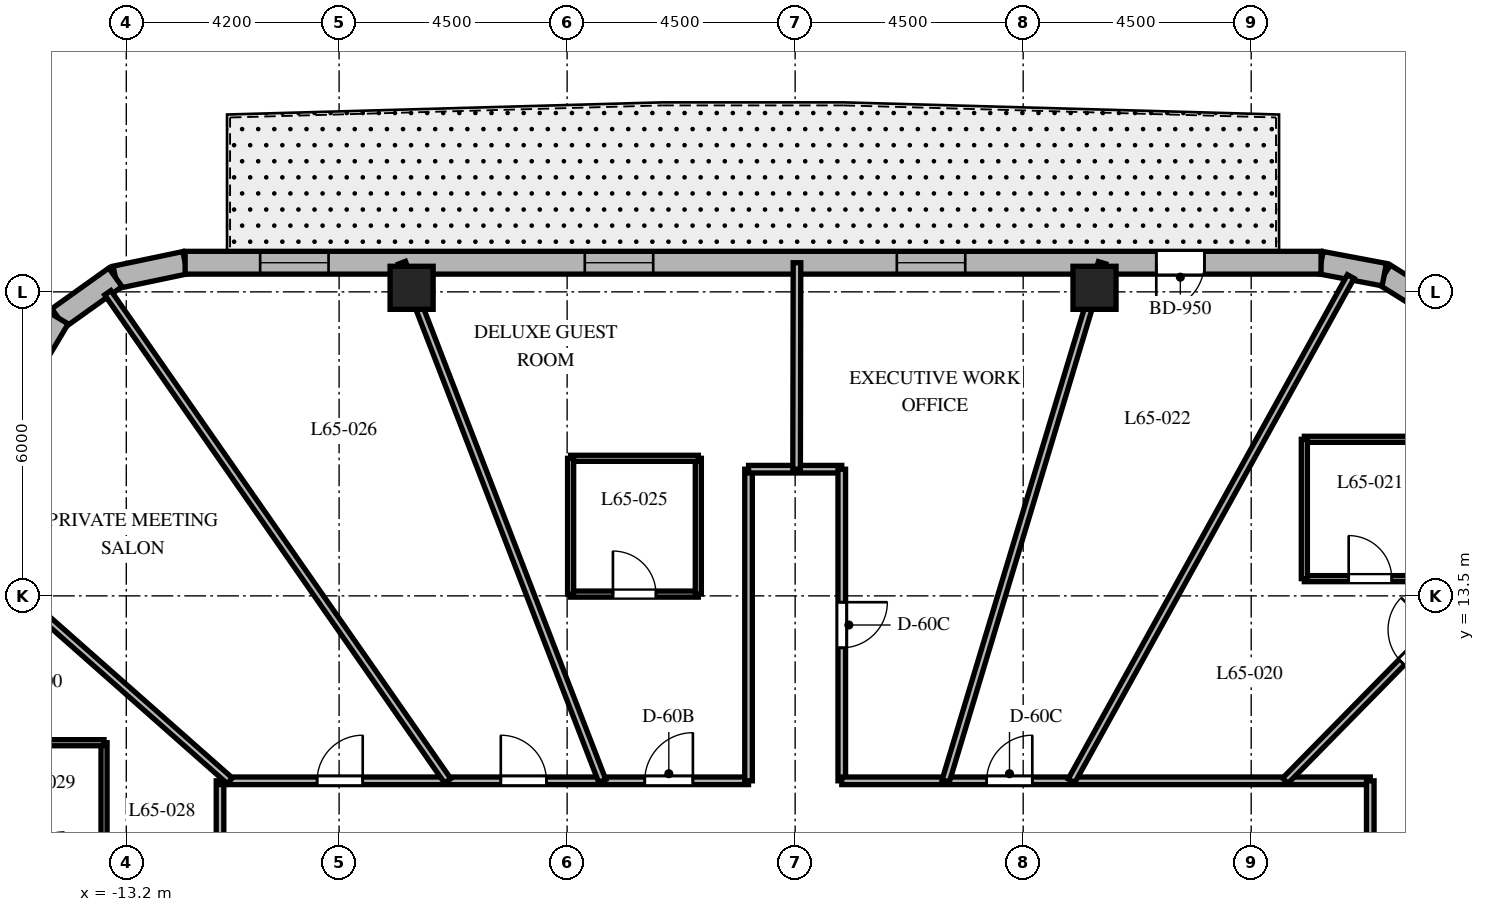
"""IFC4 building model, lengths in metres.
Left out: names, types, materials, properties, quantities, classifications, styles, units other than length and angle.
Written with IfcOpenShell. Run it as: python <this file> out.ifc"""

import sys

from ifc_helpers import new_model, si_unit, direction, frame, frame_2d, origin, origin_2d, place, context, subcontext, project, spatial, rectangle, extrude, element, fill, save


model = new_model("IFC4")
c1 = context("Model", 3, precision=1e-05, world=origin(), true_north=direction((0.0, 1.0)))
c2 = subcontext(c1, "Body", "Model", "MODEL_VIEW")
j1 = project(units=[si_unit("LENGTHUNIT", "METRE"), si_unit("PLANEANGLEUNIT", "RADIAN")], contexts=[c1])
p1 = place(None, origin())
s1 = spatial("IfcSite", under=j1, at=p1, CompositionType="ELEMENT")
p2 = place(p1, origin())
s2 = spatial("IfcBuilding", under=s1, at=p2, CompositionType="ELEMENT")
p3 = place(p2, frame((0.0, 0.0, 261.3)))
s3 = spatial("IfcBuildingStorey", under=s2, at=p3, CompositionType="ELEMENT", Elevation=261.3)
for number, where, z_axis, x_axis in (
    (1, (5.908, 19.58, 0.0), (0.0, 0.0, 1.0), (1.0, 0.0, 0.0)),
    (2, (-7.569, 19.58, 0.0), (0.0, 0.0, 1.0), (1.0, 0.0, 0.0)),
):
    element("IfcColumn", number, at=place(p3, frame(where, z_axis=z_axis, x_axis=x_axis)), inside=s3, PredefinedType="COLUMN", context=c2, shape_type="SweptSolid", body=[
        extrude(rectangle(XDim=0.85, YDim=0.85, at=origin_2d()), origin(), (0.0, 0.0, 1.0), 3.9),
    ])
p4 = place(p3, frame((12.685, 19.178, 0.0), z_axis=(0.0, 0.0, 1.0), x_axis=(-0.848031272749, 0.529946186362, 0.0)))
e3 = element("IfcWall", 3, at=p4, inside=s3, PredefinedType="SOLIDWALL", context=c2, shape_type="SweptSolid", body=[
    extrude(rectangle(XDim=1.248, YDim=0.45, at=frame_2d((0.624, 0.0))), origin(), (0.0, 0.0, 1.0), 3.6),
])
p5 = place(p3, frame((11.626, 19.84, 0.0), z_axis=(0.0, 0.0, 1.0), x_axis=(-0.982701956681, 0.185194126083, 0.0)))
e4 = element("IfcWall", 4, at=p5, inside=s3, PredefinedType="SOLIDWALL", context=c2, shape_type="SweptSolid", body=[
    extrude(rectangle(XDim=1.27, YDim=0.45, at=frame_2d((0.635, 0.0))), origin(), (0.0, 0.0, 1.0), 3.6),
])
p6 = place(p3, frame((-12.038, 20.075, 0.0), z_axis=(0.0, 0.0, 1.0), x_axis=(-0.978750122553, -0.205056571711, 0.0)))
e5 = element("IfcWall", 5, at=p6, inside=s3, PredefinedType="SOLIDWALL", context=c2, shape_type="SweptSolid", body=[
    extrude(rectangle(XDim=1.406, YDim=0.45, at=frame_2d((0.703, 0.0))), origin(), (0.0, 0.0, 1.0), 3.6),
])
p7 = place(p3, frame((-13.415, 19.787, 0.0), z_axis=(0.0, 0.0, 1.0), x_axis=(-0.814055493997, -0.580787097561, 0.0)))
e6 = element("IfcWall", 6, at=p7, inside=s3, PredefinedType="SOLIDWALL", context=c2, shape_type="SweptSolid", body=[
    extrude(rectangle(XDim=1.383, YDim=0.45, at=frame_2d((0.691, 0.0))), origin(), (0.0, 0.0, 1.0), 3.6),
])
p8 = place(p3, frame((-14.54, 18.984, 0.0), z_axis=(0.0, 0.0, 1.0), x_axis=(-0.512374906623, -0.858761873317, 0.0)))
e7 = element("IfcWall", 7, at=p8, inside=s3, PredefinedType="SOLIDWALL", context=c2, shape_type="SweptSolid", body=[
    extrude(rectangle(XDim=1.406, YDim=0.45, at=frame_2d((0.703, 0.0))), origin(), (0.0, 0.0, 1.0), 3.6),
])
p9 = place(p3, frame((10.379, 20.075, 0.0), z_axis=(0.0, 0.0, 1.0), x_axis=(-1.0, 0.0, 0.0)))
e8 = element("IfcWall", 8, at=p9, inside=s3, PredefinedType="SOLIDWALL", context=c2, shape_type="SweptSolid", body=[
    extrude(rectangle(XDim=22.417, YDim=0.45, at=frame_2d((11.208, 0.0))), origin(), (0.0, 0.0, 1.0), 3.6),
])
p10 = place(p9, frame((2.302, 0.0, 0.0)))
e9 = element("IfcOpeningElement", 9, at=p10, cuts=e8, PredefinedType="OPENING", context=c2, shape_type="SweptSolid", body=[
    extrude(rectangle(XDim=0.95, YDim=2.15, at=frame_2d((0.475, 1.075))), frame((0.0, 0.235, 0.0), z_axis=(0.0, -1.0, 0.0), x_axis=(1.0, 0.0, 0.0)), (0.0, 0.0, 1.0), 0.47),
])
p11 = place(p9, frame((7.022, 0.0, 0.8)))
e10 = element("IfcOpeningElement", 10, at=p11, cuts=e8, PredefinedType="OPENING", context=c2, shape_type="SweptSolid", body=[
    extrude(rectangle(XDim=1.35, YDim=1.75, at=frame_2d((0.675, 0.875))), frame((0.0, 0.235, 0.0), z_axis=(0.0, -1.0, 0.0), x_axis=(1.0, 0.0, 0.0)), (0.0, 0.0, 1.0), 0.47),
])
p12 = place(p9, frame((13.18, 0.0, 0.8)))
e11 = element("IfcOpeningElement", 11, at=p12, cuts=e8, PredefinedType="OPENING", context=c2, shape_type="SweptSolid", body=[
    extrude(rectangle(XDim=1.35, YDim=1.75, at=frame_2d((0.675, 0.875))), frame((0.0, 0.235, 0.0), z_axis=(0.0, -1.0, 0.0), x_axis=(1.0, 0.0, 0.0)), (0.0, 0.0, 1.0), 0.47),
])
p13 = place(p9, frame((19.587, 0.0, 0.8)))
e12 = element("IfcOpeningElement", 12, at=p13, cuts=e8, PredefinedType="OPENING", context=c2, shape_type="SweptSolid", body=[
    extrude(rectangle(XDim=1.35, YDim=1.75, at=frame_2d((0.675, 0.875))), frame((0.0, 0.235, 0.0), z_axis=(0.0, -1.0, 0.0), x_axis=(1.0, 0.0, 0.0)), (0.0, 0.0, 1.0), 0.47),
])
p14 = place(p3, frame((-11.35, 4.4, 0.0), z_axis=(0.0, 0.0, 1.0), x_axis=(0.0, 1.0, 0.0)))
e13 = element("IfcWall", 13, at=p14, inside=s3, PredefinedType="PARTITIONING", context=c2, shape_type="SweptSolid", body=[
    extrude(rectangle(XDim=5.45, YDim=0.15, at=frame_2d((2.725, 0.0))), origin(), (0.0, 0.0, 1.0), 3.09),
])
p15 = place(p14, frame((2.458, 0.0, 0.0)))
e14 = element("IfcOpeningElement", 14, at=p15, cuts=e13, PredefinedType="OPENING", context=c2, shape_type="SweptSolid", body=[
    extrude(rectangle(XDim=0.95, YDim=2.03, at=frame_2d((0.475, 1.015))), frame((0.0, 0.085, 0.0), z_axis=(0.0, -1.0, 0.0), x_axis=(1.0, 0.0, 0.0)), (0.0, 0.0, 1.0), 0.17),
])
p16 = place(p3, frame((-11.35, 9.85, 0.0), z_axis=(0.0, 0.0, 1.0), x_axis=(1.0, 0.0, 0.0)))
e15 = element("IfcWall", 15, at=p16, inside=s3, PredefinedType="PARTITIONING", context=c2, shape_type="SweptSolid", body=[
    extrude(rectangle(XDim=10.43, YDim=0.15, at=frame_2d((5.215, 0.0))), origin(), (0.0, 0.0, 1.0), 3.09),
])
p17 = place(p16, frame((8.382, 0.0, 0.0)))
e16 = element("IfcOpeningElement", 16, at=p17, cuts=e15, PredefinedType="OPENING", context=c2, shape_type="SweptSolid", body=[
    extrude(rectangle(XDim=0.95, YDim=2.03, at=frame_2d((0.475, 1.015))), frame((0.0, 0.085, 0.0), z_axis=(0.0, -1.0, 0.0), x_axis=(1.0, 0.0, 0.0)), (0.0, 0.0, 1.0), 0.17),
])
p18 = place(p16, frame((5.541, 0.0, 0.0)))
e17 = element("IfcOpeningElement", 17, at=p18, cuts=e15, PredefinedType="OPENING", context=c2, shape_type="SweptSolid", body=[
    extrude(rectangle(XDim=0.9, YDim=2.03, at=frame_2d((0.45, 1.015))), frame((0.0, 0.085, 0.0), z_axis=(0.0, -1.0, 0.0), x_axis=(1.0, 0.0, 0.0)), (0.0, 0.0, 1.0), 0.17),
])
p19 = place(p16, frame((1.916, 0.0, 0.0)))
e18 = element("IfcOpeningElement", 18, at=p19, cuts=e15, PredefinedType="OPENING", context=c2, shape_type="SweptSolid", body=[
    extrude(rectangle(XDim=0.9, YDim=2.03, at=frame_2d((0.45, 1.015))), frame((0.0, 0.085, 0.0), z_axis=(0.0, -1.0, 0.0), x_axis=(1.0, 0.0, 0.0)), (0.0, 0.0, 1.0), 0.17),
])
p20 = place(p3, frame((-0.92, 9.85, 0.0), z_axis=(0.0, 0.0, 1.0), x_axis=(0.0, 1.0, 0.0)))
e19 = element("IfcWall", 19, at=p20, inside=s3, PredefinedType="PARTITIONING", context=c2, shape_type="SweptSolid", body=[
    extrude(rectangle(XDim=6.15, YDim=0.15, at=frame_2d((3.075, 0.0))), origin(), (0.0, 0.0, 1.0), 3.041),
])
p21 = place(p3, frame((-0.92, 16.0, 0.0), z_axis=(0.0, 0.0, 1.0), x_axis=(1.0, 0.0, 0.0)))
e20 = element("IfcWall", 20, at=p21, inside=s3, PredefinedType="PARTITIONING", context=c2, shape_type="SweptSolid", body=[
    extrude(rectangle(XDim=1.84, YDim=0.15, at=frame_2d((0.92, 0.0))), origin(), (0.0, 0.0, 1.0), 3.6),
])
p22 = place(p3, frame((0.92, 16.0, 0.0), z_axis=(0.0, 0.0, 1.0), x_axis=(0.0, -1.0, 0.0)))
e21 = element("IfcWall", 21, at=p22, inside=s3, PredefinedType="PARTITIONING", context=c2, shape_type="SweptSolid", body=[
    extrude(rectangle(XDim=6.15, YDim=0.15, at=frame_2d((3.075, 0.0))), origin(), (0.0, 0.0, 1.0), 3.041),
])
p23 = place(p22, frame((2.625, 0.0, 0.0)))
e22 = element("IfcOpeningElement", 22, at=p23, cuts=e21, PredefinedType="OPENING", context=c2, shape_type="SweptSolid", body=[
    extrude(rectangle(XDim=0.9, YDim=2.03, at=frame_2d((0.45, 1.015))), frame((0.0, 0.085, 0.0), z_axis=(0.0, -1.0, 0.0), x_axis=(1.0, 0.0, 0.0)), (0.0, 0.0, 1.0), 0.17),
])
p24 = place(p3, frame((0.92, 9.85, 0.0), z_axis=(0.0, 0.0, 1.0), x_axis=(1.0, 0.0, 0.0)))
e23 = element("IfcWall", 23, at=p24, inside=s3, PredefinedType="PARTITIONING", context=c2, shape_type="SweptSolid", body=[
    extrude(rectangle(XDim=10.43, YDim=0.15, at=frame_2d((5.215, 0.0))), origin(), (0.0, 0.0, 1.0), 3.09),
])
p25 = place(p24, frame((2.86, 0.0, 0.0)))
e24 = element("IfcOpeningElement", 24, at=p25, cuts=e23, PredefinedType="OPENING", context=c2, shape_type="SweptSolid", body=[
    extrude(rectangle(XDim=0.9, YDim=2.03, at=frame_2d((0.45, 1.015))), frame((0.0, 0.085, 0.0), z_axis=(0.0, -1.0, 0.0), x_axis=(1.0, 0.0, 0.0)), (0.0, 0.0, 1.0), 0.17),
])
p26 = place(p3, frame((11.35, 9.85, 0.0), z_axis=(0.0, 0.0, 1.0), x_axis=(0.0, -1.0, 0.0)))
e25 = element("IfcWall", 25, at=p26, inside=s3, PredefinedType="PARTITIONING", context=c2, shape_type="SweptSolid", body=[
    extrude(rectangle(XDim=12.4, YDim=0.15, at=frame_2d((6.2, 0.0))), origin(), (0.0, 0.0, 1.0), 3.09),
])
p27 = place(p26, frame((7.697, 0.0, 0.0)))
e26 = element("IfcOpeningElement", 26, at=p27, cuts=e25, PredefinedType="OPENING", context=c2, shape_type="SweptSolid", body=[
    extrude(rectangle(XDim=0.95, YDim=2.03, at=frame_2d((0.475, 1.015))), frame((0.0, 0.085, 0.0), z_axis=(0.0, -1.0, 0.0), x_axis=(1.0, 0.0, 0.0)), (0.0, 0.0, 1.0), 0.17),
])
p28 = place(p26, frame((2.973, 0.0, 0.0)))
e27 = element("IfcOpeningElement", 27, at=p28, cuts=e25, PredefinedType="OPENING", context=c2, shape_type="SweptSolid", body=[
    extrude(rectangle(XDim=1.0, YDim=2.03, at=frame_2d((0.5, 1.015))), frame((0.0, 0.085, 0.0), z_axis=(0.0, -1.0, 0.0), x_axis=(1.0, 0.0, 0.0)), (0.0, 0.0, 1.0), 0.17),
])
p29 = place(p26, frame((10.333, 0.0, 0.0)))
e28 = element("IfcOpeningElement", 28, at=p29, cuts=e25, PredefinedType="OPENING", context=c2, shape_type="SweptSolid", body=[
    extrude(rectangle(XDim=0.9, YDim=2.03, at=frame_2d((0.45, 1.015))), frame((0.0, 0.085, 0.0), z_axis=(0.0, -1.0, 0.0), x_axis=(1.0, 0.0, 0.0)), (0.0, 0.0, 1.0), 0.17),
])
p30 = place(p3, frame((9.672, 9.85, 0.0), z_axis=(0.0, 0.0, 1.0), x_axis=(0.700629771301, 0.713524998558, 0.0)))
e29 = element("IfcWall", 29, at=p30, inside=s3, PredefinedType="PARTITIONING", context=c2, shape_type="SweptSolid", body=[
    extrude(rectangle(XDim=7.459, YDim=0.15, at=frame_2d((3.73, 0.0))), origin(), (0.0, 0.0, 1.0), 2.94),
])
p31 = place(p30, frame((3.28, 0.0, 0.0)))
e30 = element("IfcOpeningElement", 30, at=p31, cuts=e29, PredefinedType="OPENING", context=c2, shape_type="SweptSolid", body=[
    extrude(rectangle(XDim=0.9, YDim=2.03, at=frame_2d((0.45, 1.015))), frame((0.0, 0.085, 0.0), z_axis=(0.0, -1.0, 0.0), x_axis=(1.0, 0.0, 0.0)), (0.0, 0.0, 1.0), 0.17),
])
p32 = place(p3, frame((5.454, 9.85, 0.0), z_axis=(0.0, 0.0, 1.0), x_axis=(0.48439420613, 0.874849846012, 0.0)))
e31 = element("IfcWall", 31, at=p32, inside=s3, PredefinedType="PARTITIONING", context=c2, shape_type="SweptSolid", body=[
    extrude(rectangle(XDim=11.375, YDim=0.15, at=frame_2d((5.688, 0.0))), origin(), (0.0, 0.0, 1.0), 2.94),
])
p33 = place(p3, frame((2.972, 9.85, 0.0), z_axis=(0.0, 0.0, 1.0), x_axis=(0.288872169679, 0.957367677324, 0.0)))
e32 = element("IfcWall", 32, at=p33, inside=s3, PredefinedType="PARTITIONING", context=c2, shape_type="SweptSolid", body=[
    extrude(rectangle(XDim=10.68, YDim=0.15, at=frame_2d((5.34, 0.0))), origin(), (0.0, 0.0, 1.0), 2.94),
])
p34 = place(p3, frame((0.029, 16.0, 0.0), z_axis=(0.0, 0.0, 1.0), x_axis=(0.001797372928, 0.999998384724, 0.0)))
e33 = element("IfcWall", 33, at=p34, inside=s3, PredefinedType="PARTITIONING", context=c2, shape_type="SweptSolid", body=[
    extrude(rectangle(XDim=4.075, YDim=0.15, at=frame_2d((2.038, 0.0))), origin(), (0.0, 0.0, 1.0), 2.94),
])
p35 = place(p3, frame((-3.808, 9.85, 0.0), z_axis=(0.0, 0.0, 1.0), x_axis=(-0.360587327934, 0.932725457427, 0.0)))
e34 = element("IfcWall", 34, at=p35, inside=s3, PredefinedType="PARTITIONING", context=c2, shape_type="SweptSolid", body=[
    extrude(rectangle(XDim=10.962, YDim=0.15, at=frame_2d((5.481, 0.0))), origin(), (0.0, 0.0, 1.0), 2.94),
])
p36 = place(p3, frame((-6.858, 9.85, 0.0), z_axis=(0.0, 0.0, 1.0), x_axis=(-0.571391702066, 0.820677477948, 0.0)))
e35 = element("IfcWall", 35, at=p36, inside=s3, PredefinedType="PARTITIONING", context=c2, shape_type="SweptSolid", body=[
    extrude(rectangle(XDim=11.738, YDim=0.15, at=frame_2d((5.869, 0.0))), origin(), (0.0, 0.0, 1.0), 2.94),
])
p37 = place(p3, frame((-11.157, 9.85, 0.0), z_axis=(0.0, 0.0, 1.0), x_axis=(-0.74966962095, 0.661812253909, 0.0)))
e36 = element("IfcWall", 36, at=p37, inside=s3, PredefinedType="PARTITIONING", context=c2, shape_type="SweptSolid", body=[
    extrude(rectangle(XDim=6.989, YDim=0.15, at=frame_2d((3.494, 0.0))), origin(), (0.0, 0.0, 1.0), 2.94),
])
p38 = place(p3, frame((10.049, 13.84, 0.0), z_axis=(0.0, 0.0, 1.0), x_axis=(1.0, 0.0, 0.0)))
e37 = element("IfcWall", 37, at=p38, inside=s3, PredefinedType="PARTITIONING", context=c2, shape_type="SweptSolid", body=[
    extrude(rectangle(XDim=2.6, YDim=0.12, at=frame_2d((1.3, 0.0))), origin(), (0.0, 0.0, 1.0), 3.6),
])
p39 = place(p38, frame((0.875, 0.0, 0.0)))
e38 = element("IfcOpeningElement", 38, at=p39, cuts=e37, PredefinedType="OPENING", context=c2, shape_type="SweptSolid", body=[
    extrude(rectangle(XDim=0.85, YDim=2.03, at=frame_2d((0.425, 1.015))), frame((0.0, 0.07, 0.0), z_axis=(0.0, -1.0, 0.0), x_axis=(1.0, 0.0, 0.0)), (0.0, 0.0, 1.0), 0.14),
])
p40 = place(p3, frame((12.649, 16.59, 0.0), z_axis=(0.0, 0.0, 1.0), x_axis=(-1.0, 0.0, 0.0)))
e39 = element("IfcWall", 39, at=p40, inside=s3, PredefinedType="PARTITIONING", context=c2, shape_type="SweptSolid", body=[
    extrude(rectangle(XDim=2.6, YDim=0.12, at=frame_2d((1.3, 0.0))), origin(), (0.0, 0.0, 1.0), 2.94),
])
p41 = place(p3, frame((10.049, 16.59, 0.0), z_axis=(0.0, 0.0, 1.0), x_axis=(0.0, -1.0, 0.0)))
e40 = element("IfcWall", 40, at=p41, inside=s3, PredefinedType="PARTITIONING", context=c2, shape_type="SweptSolid", body=[
    extrude(rectangle(XDim=2.75, YDim=0.12, at=frame_2d((1.375, 0.0))), origin(), (0.0, 0.0, 1.0), 3.6),
])
p42 = place(p3, frame((-4.431, 13.535, 0.0), z_axis=(0.0, 0.0, 1.0), x_axis=(1.0, 0.0, 0.0)))
e41 = element("IfcWall", 41, at=p42, inside=s3, PredefinedType="PARTITIONING", context=c2, shape_type="SweptSolid", body=[
    extrude(rectangle(XDim=2.52, YDim=0.12, at=frame_2d((1.26, 0.0))), origin(), (0.0, 0.0, 1.0), 3.6),
])
p43 = place(p42, frame((0.835, 0.0, 0.0)))
e42 = element("IfcOpeningElement", 42, at=p43, cuts=e41, PredefinedType="OPENING", context=c2, shape_type="SweptSolid", body=[
    extrude(rectangle(XDim=0.85, YDim=2.03, at=frame_2d((0.425, 1.015))), frame((0.0, 0.07, 0.0), z_axis=(0.0, -1.0, 0.0), x_axis=(1.0, 0.0, 0.0)), (0.0, 0.0, 1.0), 0.14),
])
p44 = place(p3, frame((-1.911, 13.535, 0.0), z_axis=(0.0, 0.0, 1.0), x_axis=(0.0, 1.0, 0.0)))
e43 = element("IfcWall", 43, at=p44, inside=s3, PredefinedType="PARTITIONING", context=c2, shape_type="SweptSolid", body=[
    extrude(rectangle(XDim=2.68, YDim=0.12, at=frame_2d((1.34, 0.0))), origin(), (0.0, 0.0, 1.0), 3.041),
])
p45 = place(p3, frame((-1.911, 16.215, 0.0), z_axis=(0.0, 0.0, 1.0), x_axis=(-1.0, 0.0, 0.0)))
e44 = element("IfcWall", 44, at=p45, inside=s3, PredefinedType="PARTITIONING", context=c2, shape_type="SweptSolid", body=[
    extrude(rectangle(XDim=2.52, YDim=0.12, at=frame_2d((1.26, 0.0))), origin(), (0.0, 0.0, 1.0), 3.6),
])
p46 = place(p3, frame((-4.431, 16.215, 0.0), z_axis=(0.0, 0.0, 1.0), x_axis=(0.0, -1.0, 0.0)))
e45 = element("IfcWall", 45, at=p46, inside=s3, PredefinedType="PARTITIONING", context=c2, shape_type="SweptSolid", body=[
    extrude(rectangle(XDim=2.68, YDim=0.12, at=frame_2d((1.34, 0.0))), origin(), (0.0, 0.0, 1.0), 3.041),
])
p47 = place(p3, frame((-13.639, 7.992, 0.0), z_axis=(0.0, 0.0, 1.0), x_axis=(0.0, 1.0, 0.0)))
e46 = element("IfcWall", 46, at=p47, inside=s3, PredefinedType="PARTITIONING", context=c2, shape_type="SweptSolid", body=[
    extrude(rectangle(XDim=2.61, YDim=0.12, at=frame_2d((1.305, 0.0))), origin(), (0.0, 0.0, 1.0), 3.6),
])
p48 = place(p3, frame((-13.639, 10.602, 0.0), z_axis=(0.0, 0.0, 1.0), x_axis=(-1.0, 0.0, 0.0)))
e47 = element("IfcWall", 47, at=p48, inside=s3, PredefinedType="PARTITIONING", context=c2, shape_type="SweptSolid", body=[
    extrude(rectangle(XDim=2.44, YDim=0.12, at=frame_2d((1.22, 0.0))), origin(), (0.0, 0.0, 1.0), 3.172),
])
p49 = place(p10, origin())
e48 = element("IfcDoor", 48, at=p49, inside=s3, OperationType="SINGLE_SWING_RIGHT", PredefinedType="DOOR", context=c2, shape_type="SweptSolid", body=[
    extrude(rectangle(XDim=0.95, YDim=2.15, at=frame_2d((0.475, 1.075))), frame((0.0, 0.025, 0.0), z_axis=(0.0, -1.0, 0.0), x_axis=(1.0, 0.0, 0.0)), (0.0, 0.0, 1.0), 0.05),
])
fill(e9, e48)
p50 = place(p11, origin())
e49 = element("IfcWindow", 49, at=p50, inside=s3, PartitioningType="SINGLE_PANEL", PredefinedType="WINDOW", context=c2, shape_type="SweptSolid", body=[
    extrude(rectangle(XDim=1.35, YDim=1.75, at=frame_2d((0.675, 0.875))), frame((0.0, 0.03, 0.0), z_axis=(0.0, -1.0, 0.0), x_axis=(1.0, 0.0, 0.0)), (0.0, 0.0, 1.0), 0.06),
])
fill(e10, e49)
p51 = place(p12, origin())
e50 = element("IfcWindow", 50, at=p51, inside=s3, PartitioningType="SINGLE_PANEL", PredefinedType="WINDOW", context=c2, shape_type="SweptSolid", body=[
    extrude(rectangle(XDim=1.35, YDim=1.75, at=frame_2d((0.675, 0.875))), frame((0.0, 0.03, 0.0), z_axis=(0.0, -1.0, 0.0), x_axis=(1.0, 0.0, 0.0)), (0.0, 0.0, 1.0), 0.06),
])
fill(e11, e50)
p52 = place(p13, origin())
e51 = element("IfcWindow", 51, at=p52, inside=s3, PartitioningType="SINGLE_PANEL", PredefinedType="WINDOW", context=c2, shape_type="SweptSolid", body=[
    extrude(rectangle(XDim=1.35, YDim=1.75, at=frame_2d((0.675, 0.875))), frame((0.0, 0.03, 0.0), z_axis=(0.0, -1.0, 0.0), x_axis=(1.0, 0.0, 0.0)), (0.0, 0.0, 1.0), 0.06),
])
fill(e12, e51)
p53 = place(p31, origin())
e52 = element("IfcDoor", 52, at=p53, inside=s3, OperationType="SINGLE_SWING_RIGHT", PredefinedType="DOOR", context=c2, shape_type="SweptSolid", body=[
    extrude(rectangle(XDim=0.9, YDim=2.03, at=frame_2d((0.45, 1.015))), frame((0.0, 0.025, 0.0), z_axis=(0.0, -1.0, 0.0), x_axis=(1.0, 0.0, 0.0)), (0.0, 0.0, 1.0), 0.05),
])
fill(e30, e52)
p54 = place(p39, origin())
e53 = element("IfcDoor", 53, at=p54, inside=s3, OperationType="SINGLE_SWING_LEFT", PredefinedType="DOOR", context=c2, shape_type="SweptSolid", body=[
    extrude(rectangle(XDim=0.85, YDim=2.03, at=frame_2d((0.425, 1.015))), frame((0.0, 0.025, 0.0), z_axis=(0.0, -1.0, 0.0), x_axis=(1.0, 0.0, 0.0)), (0.0, 0.0, 1.0), 0.05),
])
fill(e38, e53)
p55 = place(p25, origin())
e54 = element("IfcDoor", 54, at=p55, inside=s3, OperationType="SINGLE_SWING_RIGHT", PredefinedType="DOOR", context=c2, shape_type="SweptSolid", body=[
    extrude(rectangle(XDim=0.9, YDim=2.03, at=frame_2d((0.45, 1.015))), frame((0.0, 0.025, 0.0), z_axis=(0.0, -1.0, 0.0), x_axis=(1.0, 0.0, 0.0)), (0.0, 0.0, 1.0), 0.05),
])
fill(e24, e54)
p56 = place(p23, origin())
e55 = element("IfcDoor", 55, at=p56, inside=s3, OperationType="SINGLE_SWING_LEFT", PredefinedType="DOOR", context=c2, shape_type="SweptSolid", body=[
    extrude(rectangle(XDim=0.9, YDim=2.03, at=frame_2d((0.45, 1.015))), frame((0.0, 0.025, 0.0), z_axis=(0.0, -1.0, 0.0), x_axis=(1.0, 0.0, 0.0)), (0.0, 0.0, 1.0), 0.05),
])
fill(e22, e55)
p57 = place(p17, origin())
e56 = element("IfcDoor", 56, at=p57, inside=s3, OperationType="SINGLE_SWING_RIGHT", PredefinedType="DOOR", context=c2, shape_type="SweptSolid", body=[
    extrude(rectangle(XDim=0.95, YDim=2.03, at=frame_2d((0.475, 1.015))), frame((0.0, 0.025, 0.0), z_axis=(0.0, -1.0, 0.0), x_axis=(1.0, 0.0, 0.0)), (0.0, 0.0, 1.0), 0.05),
])
fill(e16, e56)
p58 = place(p43, origin())
e57 = element("IfcDoor", 57, at=p58, inside=s3, OperationType="SINGLE_SWING_LEFT", PredefinedType="DOOR", context=c2, shape_type="SweptSolid", body=[
    extrude(rectangle(XDim=0.85, YDim=2.03, at=frame_2d((0.425, 1.015))), frame((0.0, 0.025, 0.0), z_axis=(0.0, -1.0, 0.0), x_axis=(1.0, 0.0, 0.0)), (0.0, 0.0, 1.0), 0.05),
])
fill(e42, e57)
p59 = place(p18, origin())
e58 = element("IfcDoor", 58, at=p59, inside=s3, OperationType="SINGLE_SWING_LEFT", PredefinedType="DOOR", context=c2, shape_type="SweptSolid", body=[
    extrude(rectangle(XDim=0.9, YDim=2.03, at=frame_2d((0.45, 1.015))), frame((0.0, 0.025, 0.0), z_axis=(0.0, -1.0, 0.0), x_axis=(1.0, 0.0, 0.0)), (0.0, 0.0, 1.0), 0.05),
])
fill(e17, e58)
p60 = place(p19, origin())
e59 = element("IfcDoor", 59, at=p60, inside=s3, OperationType="SINGLE_SWING_RIGHT", PredefinedType="DOOR", context=c2, shape_type="SweptSolid", body=[
    extrude(rectangle(XDim=0.9, YDim=2.03, at=frame_2d((0.45, 1.015))), frame((0.0, 0.025, 0.0), z_axis=(0.0, -1.0, 0.0), x_axis=(1.0, 0.0, 0.0)), (0.0, 0.0, 1.0), 0.05),
])
fill(e18, e59)
save(model, sys.argv[1])
